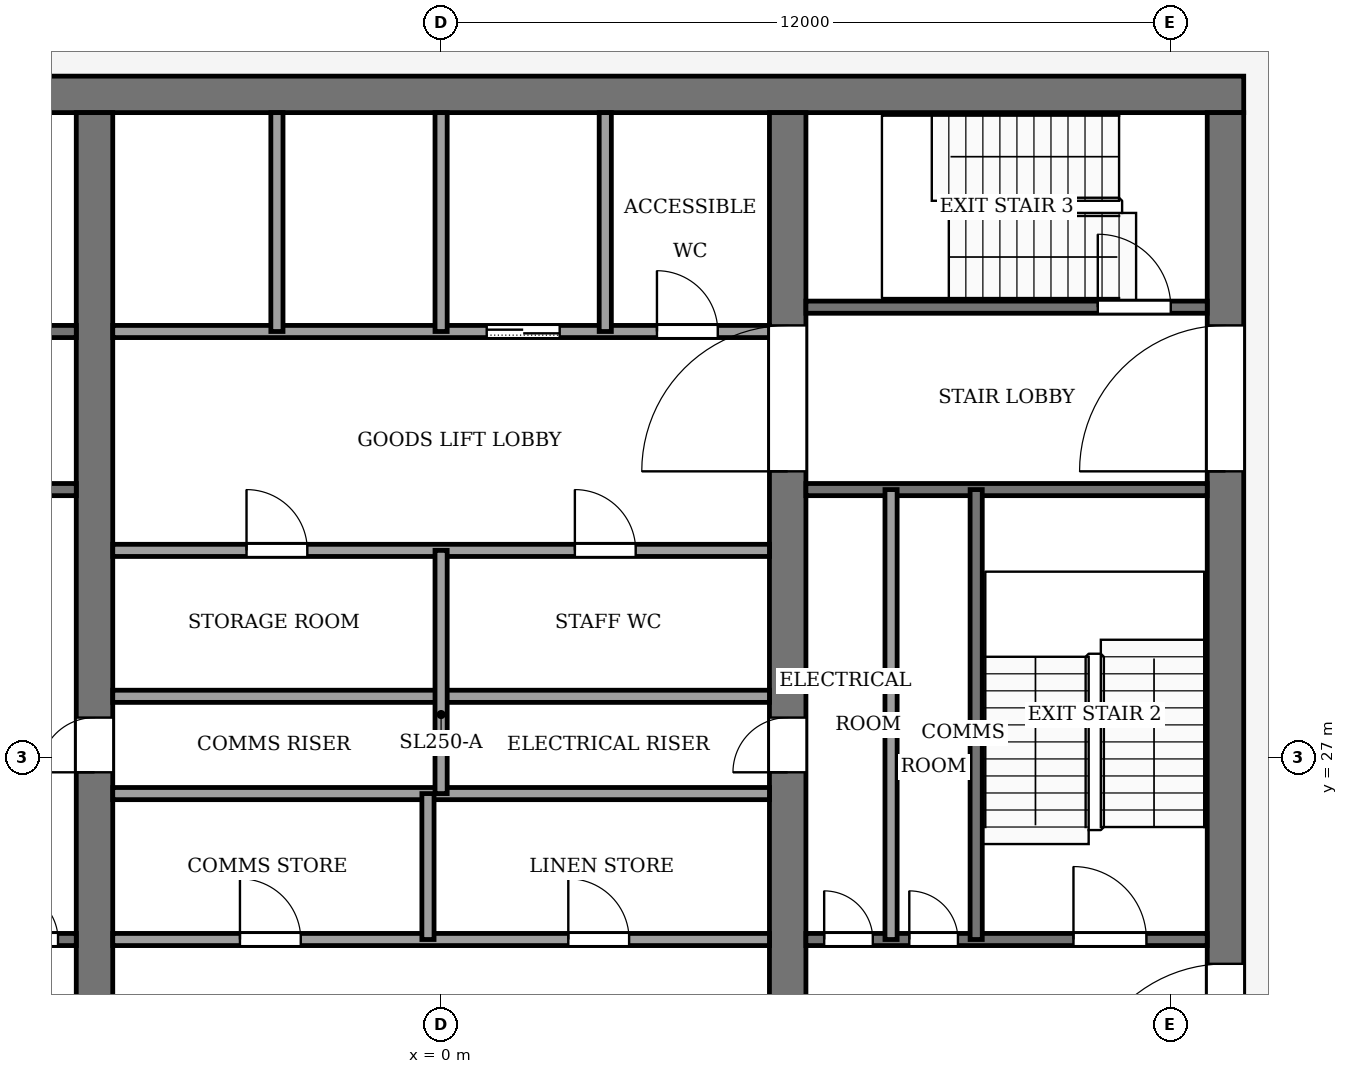
"""IFC4 building model, lengths in metres.
Left out: names, types, materials, properties, quantities, classifications, styles, units other than length and angle.
Written with IfcOpenShell. Run it as: python <this file> out.ifc"""

import sys

from ifc_helpers import new_model, si_unit, direction, frame, frame_2d, origin, place, context, subcontext, project, spatial, rectangle, extrude, element, fill, save


model = new_model("IFC4")
c1 = context("Model", 3, precision=1e-05, world=origin(), true_north=direction((0.0, 1.0)))
c2 = subcontext(c1, "Body", "Model", "MODEL_VIEW")
j1 = project(units=[si_unit("LENGTHUNIT", "METRE"), si_unit("PLANEANGLEUNIT", "RADIAN")], contexts=[c1])
p1 = place(None, origin())
s1 = spatial("IfcSite", under=j1, at=p1, CompositionType="ELEMENT")
p2 = place(p1, origin())
s2 = spatial("IfcBuilding", under=s1, at=p2, CompositionType="ELEMENT")
p3 = place(p2, frame((0.0, 0.0, 298.0)))
s3 = spatial("IfcBuildingStorey", under=s2, at=p3, CompositionType="ELEMENT", Elevation=298.0)
p4 = place(p3, frame((-13.2, 37.9, -0.13), z_axis=(0.0, 0.0, 1.0), x_axis=(1.0, 0.0, 0.0)))
e1 = element("IfcWall", 1, at=p4, inside=s3, PredefinedType="SHEAR", context=c2, shape_type="SweptSolid", body=[
    extrude(rectangle(XDim=26.4, YDim=0.6, at=frame_2d((13.2, 0.0))), origin(), (0.0, 0.0, 1.0), 4.0),
])
p5 = place(p3, frame((12.9, 18.4, -0.13), z_axis=(0.0, 0.0, 1.0), x_axis=(0.0, 1.0, 0.0)))
e2 = element("IfcWall", 2, at=p5, inside=s3, PredefinedType="SHEAR", context=c2, shape_type="SweptSolid", body=[
    extrude(rectangle(XDim=19.2, YDim=0.6, at=frame_2d((9.6, 0.0))), origin(), (0.0, 0.0, 1.0), 4.0),
])
p6 = place(p5, frame((2.8, 0.0, 0.13)))
e3 = element("IfcOpeningElement", 3, at=p6, cuts=e2, PredefinedType="OPENING", context=c2, shape_type="SweptSolid", body=[
    extrude(rectangle(XDim=2.4, YDim=2.4, at=frame_2d((1.2, 1.2))), frame((0.0, 0.31, 0.0), z_axis=(0.0, -1.0, 0.0), x_axis=(1.0, 0.0, 0.0)), (0.0, 0.0, 1.0), 0.62),
])
p7 = place(p5, frame((13.3, 0.0, 0.13)))
e4 = element("IfcOpeningElement", 4, at=p7, cuts=e2, PredefinedType="OPENING", context=c2, shape_type="SweptSolid", body=[
    extrude(rectangle(XDim=2.4, YDim=2.4, at=frame_2d((1.2, 1.2))), frame((0.0, 0.31, 0.0), z_axis=(0.0, -1.0, 0.0), x_axis=(1.0, 0.0, 0.0)), (0.0, 0.0, 1.0), 0.62),
])
p8 = place(p3, frame((-5.7, 18.4, -0.13), z_axis=(0.0, 0.0, 1.0), x_axis=(0.0, 1.0, 0.0)))
e5 = element("IfcWall", 5, at=p8, inside=s3, PredefinedType="SHEAR", context=c2, shape_type="SweptSolid", body=[
    extrude(rectangle(XDim=19.2, YDim=0.6, at=frame_2d((9.6, 0.0))), origin(), (0.0, 0.0, 1.0), 4.0),
])
p9 = place(p8, frame((8.35, 0.0, 0.13)))
e6 = element("IfcOpeningElement", 6, at=p9, cuts=e5, PredefinedType="OPENING", context=c2, shape_type="SweptSolid", body=[
    extrude(rectangle(XDim=0.9, YDim=2.1, at=frame_2d((0.45, 1.05))), frame((0.0, 0.31, 0.0), z_axis=(0.0, -1.0, 0.0), x_axis=(1.0, 0.0, 0.0)), (0.0, 0.0, 1.0), 0.62),
])
p10 = place(p3, frame((5.7, 18.4, -0.13), z_axis=(0.0, 0.0, 1.0), x_axis=(0.0, 1.0, 0.0)))
e7 = element("IfcWall", 7, at=p10, inside=s3, PredefinedType="SHEAR", context=c2, shape_type="SweptSolid", body=[
    extrude(rectangle(XDim=19.2, YDim=0.6, at=frame_2d((9.6, 0.0))), origin(), (0.0, 0.0, 1.0), 4.0),
])
p11 = place(p10, frame((8.35, 0.0, 0.13)))
e8 = element("IfcOpeningElement", 8, at=p11, cuts=e7, PredefinedType="OPENING", context=c2, shape_type="SweptSolid", body=[
    extrude(rectangle(XDim=0.9, YDim=2.1, at=frame_2d((0.45, 1.05))), frame((0.0, 0.31, 0.0), z_axis=(0.0, -1.0, 0.0), x_axis=(1.0, 0.0, 0.0)), (0.0, 0.0, 1.0), 0.62),
])
p12 = place(p10, frame((13.3, 0.0, 0.13)))
e9 = element("IfcOpeningElement", 9, at=p12, cuts=e7, PredefinedType="OPENING", context=c2, shape_type="SweptSolid", body=[
    extrude(rectangle(XDim=2.4, YDim=2.4, at=frame_2d((1.2, 1.2))), frame((0.0, 0.31, 0.0), z_axis=(0.0, -1.0, 0.0), x_axis=(1.0, 0.0, 0.0)), (0.0, 0.0, 1.0), 0.62),
])
p13 = place(p3, frame((-12.6, 24.0, 0.0), z_axis=(0.0, 0.0, 1.0), x_axis=(1.0, 0.0, 0.0)))
e10 = element("IfcWall", 10, at=p13, inside=s3, PredefinedType="PARTITIONING", context=c2, shape_type="SweptSolid", body=[
    extrude(rectangle(XDim=6.6, YDim=0.2, at=frame_2d((3.3, 0.0))), origin(), (0.0, 0.0, 1.0), 3.87),
])
p14 = place(p13, frame((4.1, 0.0, 0.0)))
e11 = element("IfcOpeningElement", 11, at=p14, cuts=e10, PredefinedType="OPENING", context=c2, shape_type="SweptSolid", body=[
    extrude(rectangle(XDim=0.8, YDim=2.1, at=frame_2d((0.4, 1.05))), frame((0.0, 0.11, 0.0), z_axis=(0.0, -1.0, 0.0), x_axis=(1.0, 0.0, 0.0)), (0.0, 0.0, 1.0), 0.22),
])
p15 = place(p13, frame((5.5, 0.0, 0.0)))
e12 = element("IfcOpeningElement", 12, at=p15, cuts=e10, PredefinedType="OPENING", context=c2, shape_type="SweptSolid", body=[
    extrude(rectangle(XDim=0.8, YDim=2.1, at=frame_2d((0.4, 1.05))), frame((0.0, 0.11, 0.0), z_axis=(0.0, -1.0, 0.0), x_axis=(1.0, 0.0, 0.0)), (0.0, 0.0, 1.0), 0.22),
])
p16 = place(p3, frame((-5.4, 24.0, 0.0), z_axis=(0.0, 0.0, 1.0), x_axis=(1.0, 0.0, 0.0)))
e13 = element("IfcWall", 13, at=p16, inside=s3, PredefinedType="PARTITIONING", context=c2, shape_type="SweptSolid", body=[
    extrude(rectangle(XDim=10.8, YDim=0.2, at=frame_2d((5.4, 0.0))), origin(), (0.0, 0.0, 1.0), 3.87),
])
p17 = place(p16, frame((2.092, 0.0, 0.0)))
e14 = element("IfcOpeningElement", 14, at=p17, cuts=e13, PredefinedType="OPENING", context=c2, shape_type="SweptSolid", body=[
    extrude(rectangle(XDim=1.0, YDim=2.1, at=frame_2d((0.5, 1.05))), frame((0.0, 0.11, 0.0), z_axis=(0.0, -1.0, 0.0), x_axis=(1.0, 0.0, 0.0)), (0.0, 0.0, 1.0), 0.22),
])
p18 = place(p16, frame((7.492, 0.0, 0.0)))
e15 = element("IfcOpeningElement", 15, at=p18, cuts=e13, PredefinedType="OPENING", context=c2, shape_type="SweptSolid", body=[
    extrude(rectangle(XDim=1.0, YDim=2.1, at=frame_2d((0.5, 1.05))), frame((0.0, 0.11, 0.0), z_axis=(0.0, -1.0, 0.0), x_axis=(1.0, 0.0, 0.0)), (0.0, 0.0, 1.0), 0.22),
])
p19 = place(p3, frame((6.0, 24.0, 0.0), z_axis=(0.0, 0.0, 1.0), x_axis=(1.0, 0.0, 0.0)))
e16 = element("IfcWall", 16, at=p19, inside=s3, PredefinedType="PARTITIONING", context=c2, shape_type="SweptSolid", body=[
    extrude(rectangle(XDim=6.6, YDim=0.2, at=frame_2d((3.3, 0.0))), origin(), (0.0, 0.0, 1.0), 3.87),
])
p20 = place(p19, frame((0.3, 0.0, 0.0)))
e17 = element("IfcOpeningElement", 17, at=p20, cuts=e16, PredefinedType="OPENING", context=c2, shape_type="SweptSolid", body=[
    extrude(rectangle(XDim=0.8, YDim=2.1, at=frame_2d((0.4, 1.05))), frame((0.0, 0.11, 0.0), z_axis=(0.0, -1.0, 0.0), x_axis=(1.0, 0.0, 0.0)), (0.0, 0.0, 1.0), 0.22),
])
p21 = place(p19, frame((1.7, 0.0, 0.0)))
e18 = element("IfcOpeningElement", 18, at=p21, cuts=e16, PredefinedType="OPENING", context=c2, shape_type="SweptSolid", body=[
    extrude(rectangle(XDim=0.8, YDim=2.1, at=frame_2d((0.4, 1.05))), frame((0.0, 0.11, 0.0), z_axis=(0.0, -1.0, 0.0), x_axis=(1.0, 0.0, 0.0)), (0.0, 0.0, 1.0), 0.22),
])
p22 = place(p19, frame((4.4, 0.0, 0.0)))
e19 = element("IfcOpeningElement", 19, at=p22, cuts=e16, PredefinedType="OPENING", context=c2, shape_type="SweptSolid", body=[
    extrude(rectangle(XDim=1.2, YDim=2.2, at=frame_2d((0.6, 1.1))), frame((0.0, 0.11, 0.0), z_axis=(0.0, -1.0, 0.0), x_axis=(1.0, 0.0, 0.0)), (0.0, 0.0, 1.0), 0.22),
])
for number, where, z_axis, x_axis in (
    (20, (-5.4, 26.4, 0.0), (0.0, 0.0, 1.0), (1.0, 0.0, 0.0)),
    (21, (-5.4, 28.0, 0.0), (0.0, 0.0, 1.0), (1.0, 0.0, 0.0)),
):
    element("IfcWall", number, at=place(p3, frame(where, z_axis=z_axis, x_axis=x_axis)), inside=s3, PredefinedType="PARTITIONING", context=c2, shape_type="SweptSolid", body=[
        extrude(rectangle(XDim=10.8, YDim=0.2, at=frame_2d((5.4, 0.0))), origin(), (0.0, 0.0, 1.0), 3.87),
    ])
p23 = place(p3, frame((-5.4, 30.4, 0.0), z_axis=(0.0, 0.0, 1.0), x_axis=(1.0, 0.0, 0.0)))
e22 = element("IfcWall", 22, at=p23, inside=s3, PredefinedType="PARTITIONING", context=c2, shape_type="SweptSolid", body=[
    extrude(rectangle(XDim=10.8, YDim=0.2, at=frame_2d((5.4, 0.0))), origin(), (0.0, 0.0, 1.0), 3.87),
])
p24 = place(p23, frame((2.2, 0.0, 0.0)))
e23 = element("IfcOpeningElement", 23, at=p24, cuts=e22, PredefinedType="OPENING", context=c2, shape_type="SweptSolid", body=[
    extrude(rectangle(XDim=1.0, YDim=2.1, at=frame_2d((0.5, 1.05))), frame((0.0, 0.11, 0.0), z_axis=(0.0, -1.0, 0.0), x_axis=(1.0, 0.0, 0.0)), (0.0, 0.0, 1.0), 0.22),
])
p25 = place(p23, frame((7.6, 0.0, 0.0)))
e24 = element("IfcOpeningElement", 24, at=p25, cuts=e22, PredefinedType="OPENING", context=c2, shape_type="SweptSolid", body=[
    extrude(rectangle(XDim=1.0, YDim=2.1, at=frame_2d((0.5, 1.05))), frame((0.0, 0.11, 0.0), z_axis=(0.0, -1.0, 0.0), x_axis=(1.0, 0.0, 0.0)), (0.0, 0.0, 1.0), 0.22),
])
p26 = place(p3, frame((-12.6, 31.4, 0.0), z_axis=(0.0, 0.0, 1.0), x_axis=(1.0, 0.0, 0.0)))
e25 = element("IfcWall", 25, at=p26, inside=s3, PredefinedType="PARTITIONING", context=c2, shape_type="SweptSolid", body=[
    extrude(rectangle(XDim=6.6, YDim=0.2, at=frame_2d((3.3, 0.0))), origin(), (0.0, 0.0, 1.0), 3.87),
])
p27 = place(p26, frame((1.0, 0.0, 0.0)))
e26 = element("IfcOpeningElement", 26, at=p27, cuts=e25, PredefinedType="OPENING", context=c2, shape_type="SweptSolid", body=[
    extrude(rectangle(XDim=1.2, YDim=2.2, at=frame_2d((0.6, 1.1))), frame((0.0, 0.11, 0.0), z_axis=(0.0, -1.0, 0.0), x_axis=(1.0, 0.0, 0.0)), (0.0, 0.0, 1.0), 0.22),
])
p28 = place(p3, frame((6.0, 31.4, 0.0), z_axis=(0.0, 0.0, 1.0), x_axis=(1.0, 0.0, 0.0)))
e27 = element("IfcWall", 27, at=p28, inside=s3, PredefinedType="PARTITIONING", context=c2, shape_type="SweptSolid", body=[
    extrude(rectangle(XDim=6.6, YDim=0.2, at=frame_2d((3.3, 0.0))), origin(), (0.0, 0.0, 1.0), 3.87),
])
p29 = place(p3, frame((-12.6, 34.0, 0.0), z_axis=(0.0, 0.0, 1.0), x_axis=(1.0, 0.0, 0.0)))
e28 = element("IfcWall", 28, at=p29, inside=s3, PredefinedType="PARTITIONING", context=c2, shape_type="SweptSolid", body=[
    extrude(rectangle(XDim=6.6, YDim=0.2, at=frame_2d((3.3, 0.0))), origin(), (0.0, 0.0, 1.0), 3.87),
])
p30 = place(p29, frame((4.7, 0.0, 0.0)))
e29 = element("IfcOpeningElement", 29, at=p30, cuts=e28, PredefinedType="OPENING", context=c2, shape_type="SweptSolid", body=[
    extrude(rectangle(XDim=1.4, YDim=2.2, at=frame_2d((0.7, 1.1))), frame((0.0, 0.11, 0.0), z_axis=(0.0, -1.0, 0.0), x_axis=(1.0, 0.0, 0.0)), (0.0, 0.0, 1.0), 0.22),
])
p31 = place(p29, frame((2.3, 0.0, 0.0)))
e30 = element("IfcOpeningElement", 30, at=p31, cuts=e28, PredefinedType="OPENING", context=c2, shape_type="SweptSolid", body=[
    extrude(rectangle(XDim=1.4, YDim=2.2, at=frame_2d((0.7, 1.1))), frame((0.0, 0.11, 0.0), z_axis=(0.0, -1.0, 0.0), x_axis=(1.0, 0.0, 0.0)), (0.0, 0.0, 1.0), 0.22),
])
p32 = place(p29, frame((0.45, 0.0, 0.0)))
e31 = element("IfcOpeningElement", 31, at=p32, cuts=e28, PredefinedType="OPENING", context=c2, shape_type="SweptSolid", body=[
    extrude(rectangle(XDim=0.9, YDim=2.1, at=frame_2d((0.45, 1.05))), frame((0.0, 0.11, 0.0), z_axis=(0.0, -1.0, 0.0), x_axis=(1.0, 0.0, 0.0)), (0.0, 0.0, 1.0), 0.22),
])
p33 = place(p3, frame((-5.4, 34.0, 0.0), z_axis=(0.0, 0.0, 1.0), x_axis=(1.0, 0.0, 0.0)))
e32 = element("IfcWall", 32, at=p33, inside=s3, PredefinedType="PARTITIONING", context=c2, shape_type="SweptSolid", body=[
    extrude(rectangle(XDim=10.8, YDim=0.2, at=frame_2d((5.4, 0.0))), origin(), (0.0, 0.0, 1.0), 3.87),
])
p34 = place(p33, frame((6.15, 0.0, 0.0)))
e33 = element("IfcOpeningElement", 33, at=p34, cuts=e32, PredefinedType="OPENING", context=c2, shape_type="SweptSolid", body=[
    extrude(rectangle(XDim=1.2, YDim=2.2, at=frame_2d((0.6, 1.1))), frame((0.0, 0.11, 0.0), z_axis=(0.0, -1.0, 0.0), x_axis=(1.0, 0.0, 0.0)), (0.0, 0.0, 1.0), 0.22),
])
p35 = place(p33, frame((8.95, 0.0, 0.0)))
e34 = element("IfcOpeningElement", 34, at=p35, cuts=e32, PredefinedType="OPENING", context=c2, shape_type="SweptSolid", body=[
    extrude(rectangle(XDim=1.0, YDim=2.1, at=frame_2d((0.5, 1.05))), frame((0.0, 0.11, 0.0), z_axis=(0.0, -1.0, 0.0), x_axis=(1.0, 0.0, 0.0)), (0.0, 0.0, 1.0), 0.22),
])
p36 = place(p3, frame((6.0, 34.4, 0.0), z_axis=(0.0, 0.0, 1.0), x_axis=(1.0, 0.0, 0.0)))
e35 = element("IfcWall", 35, at=p36, inside=s3, PredefinedType="PARTITIONING", context=c2, shape_type="SweptSolid", body=[
    extrude(rectangle(XDim=6.6, YDim=0.2, at=frame_2d((3.3, 0.0))), origin(), (0.0, 0.0, 1.0), 3.87),
])
p37 = place(p36, frame((4.8, 0.0, 0.0)))
e36 = element("IfcOpeningElement", 36, at=p37, cuts=e35, PredefinedType="OPENING", context=c2, shape_type="SweptSolid", body=[
    extrude(rectangle(XDim=1.2, YDim=2.2, at=frame_2d((0.6, 1.1))), frame((0.0, 0.11, 0.0), z_axis=(0.0, -1.0, 0.0), x_axis=(1.0, 0.0, 0.0)), (0.0, 0.0, 1.0), 0.22),
])
p38 = place(p3, frame((-2.7, 34.0, 0.0), z_axis=(0.0, 0.0, 1.0), x_axis=(0.0, 1.0, 0.0)))
e37 = element("IfcWall", 37, at=p38, inside=s3, PredefinedType="PARTITIONING", context=c2, shape_type="SweptSolid", body=[
    extrude(rectangle(XDim=3.6, YDim=0.2, at=frame_2d((1.8, 0.0))), origin(), (0.0, 0.0, 1.0), 3.87),
])
p39 = place(p3, frame((-0.216, 24.0, 0.0), z_axis=(0.0, 0.0, 1.0), x_axis=(0.0, 1.0, 0.0)))
e38 = element("IfcWall", 38, at=p39, inside=s3, PredefinedType="PARTITIONING", context=c2, shape_type="SweptSolid", body=[
    extrude(rectangle(XDim=2.4, YDim=0.2, at=frame_2d((1.2, 0.0))), origin(), (0.0, 0.0, 1.0), 3.87),
])
p40 = place(p3, frame((0.0, 26.4, 0.0), z_axis=(0.0, 0.0, 1.0), x_axis=(0.0, 1.0, 0.0)))
e39 = element("IfcWall", 39, at=p40, inside=s3, PredefinedType="PARTITIONING", context=c2, shape_type="SweptSolid", body=[
    extrude(rectangle(XDim=4.0, YDim=0.2, at=frame_2d((2.0, 0.0))), origin(), (0.0, 0.0, 1.0), 3.87),
])
for number, where, z_axis, x_axis in (
    (40, (0.0, 34.0, 0.0), (0.0, 0.0, 1.0), (0.0, 1.0, 0.0)),
    (41, (2.7, 34.0, 0.0), (0.0, 0.0, 1.0), (0.0, 1.0, 0.0)),
):
    element("IfcWall", number, at=place(p3, frame(where, z_axis=z_axis, x_axis=x_axis)), inside=s3, PredefinedType="PARTITIONING", context=c2, shape_type="SweptSolid", body=[
        extrude(rectangle(XDim=3.6, YDim=0.2, at=frame_2d((1.8, 0.0))), origin(), (0.0, 0.0, 1.0), 3.87),
    ])
for number, where, z_axis, x_axis in (
    (42, (7.4, 24.0, 0.0), (0.0, 0.0, 1.0), (0.0, 1.0, 0.0)),
    (43, (8.8, 24.0, 0.0), (0.0, 0.0, 1.0), (0.0, 1.0, 0.0)),
):
    element("IfcWall", number, at=place(p3, frame(where, z_axis=z_axis, x_axis=x_axis)), inside=s3, PredefinedType="PARTITIONING", context=c2, shape_type="SweptSolid", body=[
        extrude(rectangle(XDim=7.4, YDim=0.2, at=frame_2d((3.7, 0.0))), origin(), (0.0, 0.0, 1.0), 3.87),
    ])
p41 = place(p34, origin())
e44 = element("IfcDoor", 44, at=p41, inside=s3, OperationType="SLIDING_TO_LEFT", PredefinedType="DOOR", context=c2, shape_type="SweptSolid", body=[
    extrude(rectangle(XDim=1.2, YDim=2.2, at=frame_2d((0.6, 1.1))), frame((0.0, 0.025, 0.0), z_axis=(0.0, -1.0, 0.0), x_axis=(1.0, 0.0, 0.0)), (0.0, 0.0, 1.0), 0.05),
])
fill(e33, e44)
p42 = place(p17, origin())
e45 = element("IfcDoor", 45, at=p42, inside=s3, OperationType="SINGLE_SWING_RIGHT", PredefinedType="DOOR", context=c2, shape_type="SweptSolid", body=[
    extrude(rectangle(XDim=1.0, YDim=2.1, at=frame_2d((0.5, 1.05))), frame((0.0, 0.025, 0.0), z_axis=(0.0, -1.0, 0.0), x_axis=(1.0, 0.0, 0.0)), (0.0, 0.0, 1.0), 0.05),
])
fill(e14, e45)
p43 = place(p18, origin())
e46 = element("IfcDoor", 46, at=p43, inside=s3, OperationType="SINGLE_SWING_LEFT", PredefinedType="DOOR", context=c2, shape_type="SweptSolid", body=[
    extrude(rectangle(XDim=1.0, YDim=2.1, at=frame_2d((0.5, 1.05))), frame((0.0, 0.025, 0.0), z_axis=(0.0, -1.0, 0.0), x_axis=(1.0, 0.0, 0.0)), (0.0, 0.0, 1.0), 0.05),
])
fill(e15, e46)
p44 = place(p24, origin())
e47 = element("IfcDoor", 47, at=p44, inside=s3, OperationType="SINGLE_SWING_LEFT", PredefinedType="DOOR", context=c2, shape_type="SweptSolid", body=[
    extrude(rectangle(XDim=1.0, YDim=2.1, at=frame_2d((0.5, 1.05))), frame((0.0, 0.025, 0.0), z_axis=(0.0, -1.0, 0.0), x_axis=(1.0, 0.0, 0.0)), (0.0, 0.0, 1.0), 0.05),
])
fill(e23, e47)
p45 = place(p25, origin())
e48 = element("IfcDoor", 48, at=p45, inside=s3, OperationType="SINGLE_SWING_RIGHT", PredefinedType="DOOR", context=c2, shape_type="SweptSolid", body=[
    extrude(rectangle(XDim=1.0, YDim=2.1, at=frame_2d((0.5, 1.05))), frame((0.0, 0.025, 0.0), z_axis=(0.0, -1.0, 0.0), x_axis=(1.0, 0.0, 0.0)), (0.0, 0.0, 1.0), 0.05),
])
fill(e24, e48)
p46 = place(p15, origin())
e49 = element("IfcDoor", 49, at=p46, inside=s3, OperationType="SINGLE_SWING_LEFT", PredefinedType="DOOR", context=c2, shape_type="SweptSolid", body=[
    extrude(rectangle(XDim=0.8, YDim=2.1, at=frame_2d((0.4, 1.05))), frame((0.0, 0.025, 0.0), z_axis=(0.0, -1.0, 0.0), x_axis=(1.0, 0.0, 0.0)), (0.0, 0.0, 1.0), 0.05),
])
fill(e12, e49)
p47 = place(p20, origin())
e50 = element("IfcDoor", 50, at=p47, inside=s3, OperationType="SINGLE_SWING_RIGHT", PredefinedType="DOOR", context=c2, shape_type="SweptSolid", body=[
    extrude(rectangle(XDim=0.8, YDim=2.1, at=frame_2d((0.4, 1.05))), frame((0.0, 0.025, 0.0), z_axis=(0.0, -1.0, 0.0), x_axis=(1.0, 0.0, 0.0)), (0.0, 0.0, 1.0), 0.05),
])
fill(e17, e50)
p48 = place(p21, origin())
e51 = element("IfcDoor", 51, at=p48, inside=s3, OperationType="SINGLE_SWING_LEFT", PredefinedType="DOOR", context=c2, shape_type="SweptSolid", body=[
    extrude(rectangle(XDim=0.8, YDim=2.1, at=frame_2d((0.4, 1.05))), frame((0.0, 0.025, 0.0), z_axis=(0.0, -1.0, 0.0), x_axis=(1.0, 0.0, 0.0)), (0.0, 0.0, 1.0), 0.05),
])
fill(e18, e51)
p49 = place(p35, origin())
e52 = element("IfcDoor", 52, at=p49, inside=s3, OperationType="SINGLE_SWING_LEFT", PredefinedType="DOOR", context=c2, shape_type="SweptSolid", body=[
    extrude(rectangle(XDim=1.0, YDim=2.1, at=frame_2d((0.5, 1.05))), frame((0.0, 0.025, 0.0), z_axis=(0.0, -1.0, 0.0), x_axis=(1.0, 0.0, 0.0)), (0.0, 0.0, 1.0), 0.05),
])
fill(e34, e52)
p50 = place(p9, origin())
e53 = element("IfcDoor", 53, at=p50, inside=s3, OperationType="SINGLE_SWING_LEFT", PredefinedType="DOOR", context=c2, shape_type="SweptSolid", body=[
    extrude(rectangle(XDim=0.9, YDim=2.1, at=frame_2d((0.45, 1.05))), frame((0.0, 0.025, 0.0), z_axis=(0.0, -1.0, 0.0), x_axis=(1.0, 0.0, 0.0)), (0.0, 0.0, 1.0), 0.05),
])
fill(e6, e53)
p51 = place(p11, origin())
e54 = element("IfcDoor", 54, at=p51, inside=s3, OperationType="SINGLE_SWING_RIGHT", PredefinedType="DOOR", context=c2, shape_type="SweptSolid", body=[
    extrude(rectangle(XDim=0.9, YDim=2.1, at=frame_2d((0.45, 1.05))), frame((0.0, 0.025, 0.0), z_axis=(0.0, -1.0, 0.0), x_axis=(1.0, 0.0, 0.0)), (0.0, 0.0, 1.0), 0.05),
])
fill(e8, e54)
p52 = place(p22, origin())
e55 = element("IfcDoor", 55, at=p52, inside=s3, OperationType="SINGLE_SWING_LEFT", PredefinedType="DOOR", context=c2, shape_type="SweptSolid", body=[
    extrude(rectangle(XDim=1.2, YDim=2.2, at=frame_2d((0.6, 1.1))), frame((0.0, 0.025, 0.0), z_axis=(0.0, -1.0, 0.0), x_axis=(1.0, 0.0, 0.0)), (0.0, 0.0, 1.0), 0.05),
])
fill(e19, e55)
p53 = place(p37, origin())
e56 = element("IfcDoor", 56, at=p53, inside=s3, OperationType="SINGLE_SWING_RIGHT", PredefinedType="DOOR", context=c2, shape_type="SweptSolid", body=[
    extrude(rectangle(XDim=1.2, YDim=2.2, at=frame_2d((0.6, 1.1))), frame((0.0, 0.025, 0.0), z_axis=(0.0, -1.0, 0.0), x_axis=(1.0, 0.0, 0.0)), (0.0, 0.0, 1.0), 0.05),
])
fill(e36, e56)
p54 = place(p12, origin())
e57 = element("IfcDoor", 57, at=p54, inside=s3, OperationType="DOUBLE_DOOR_SINGLE_SWING", PredefinedType="DOOR", context=c2, shape_type="SweptSolid", body=[
    extrude(rectangle(XDim=2.4, YDim=2.4, at=frame_2d((1.2, 1.2))), frame((0.0, 0.025, 0.0), z_axis=(0.0, -1.0, 0.0), x_axis=(1.0, 0.0, 0.0)), (0.0, 0.0, 1.0), 0.05),
])
fill(e9, e57)
p55 = place(p6, origin())
e58 = element("IfcDoor", 58, at=p55, inside=s3, OperationType="DOUBLE_DOOR_SINGLE_SWING", PredefinedType="DOOR", context=c2, shape_type="SweptSolid", body=[
    extrude(rectangle(XDim=2.4, YDim=2.4, at=frame_2d((1.2, 1.2))), frame((0.0, 0.025, 0.0), z_axis=(0.0, -1.0, 0.0), x_axis=(1.0, 0.0, 0.0)), (0.0, 0.0, 1.0), 0.05),
])
fill(e3, e58)
p56 = place(p7, origin())
e59 = element("IfcDoor", 59, at=p56, inside=s3, OperationType="DOUBLE_DOOR_SINGLE_SWING", PredefinedType="DOOR", context=c2, shape_type="SweptSolid", body=[
    extrude(rectangle(XDim=2.4, YDim=2.4, at=frame_2d((1.2, 1.2))), frame((0.0, 0.025, 0.0), z_axis=(0.0, -1.0, 0.0), x_axis=(1.0, 0.0, 0.0)), (0.0, 0.0, 1.0), 0.05),
])
fill(e4, e59)
save(model, sys.argv[1])
